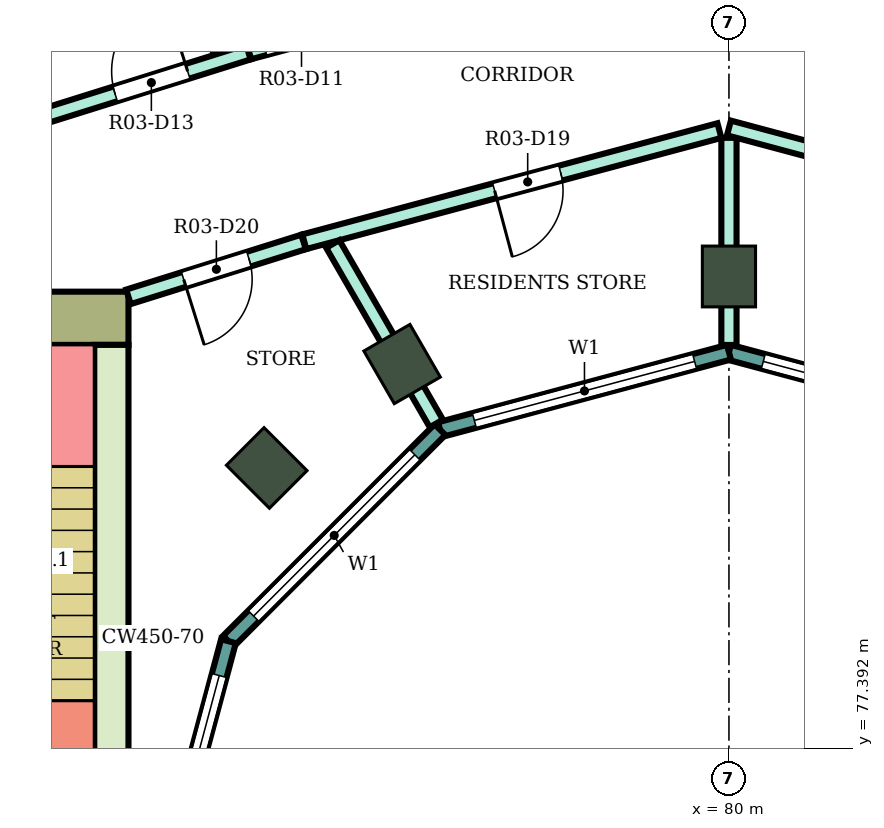
"""IFC4 building model, lengths in metres.
Left out: names, types, materials, properties, quantities, classifications, styles, units other than length and angle.
Written with IfcOpenShell. Run it as: python <this file> out.ifc"""

import sys

from ifc_helpers import new_model, si_unit, direction, frame, frame_2d, origin, origin_2d, place, context, subcontext, project, spatial, rectangle, extrude, element, fill, save


model = new_model("IFC4")
c1 = context("Model", 3, precision=1e-05, world=origin(), true_north=direction((0.0, 1.0)))
c2 = subcontext(c1, "Body", "Model", "MODEL_VIEW")
j1 = project(units=[si_unit("LENGTHUNIT", "METRE"), si_unit("PLANEANGLEUNIT", "RADIAN")], contexts=[c1])
p1 = place(None, origin())
s1 = spatial("IfcSite", under=j1, at=p1, CompositionType="ELEMENT")
p2 = place(p1, origin())
s2 = spatial("IfcBuilding", under=s1, at=p2, CompositionType="ELEMENT")
p3 = place(p2, frame((0.0, 0.0, 190.5)))
s3 = spatial("IfcBuildingStorey", under=s2, at=p3, CompositionType="ELEMENT", Elevation=190.5)
for number, where, z_axis, x_axis in (
    (1, (80.0, 83.6, 0.0), (0.0, 0.0, 1.0), (0.0, 1.0, 0.0)),
    (2, (75.7, 82.448, 0.0), (0.0, 0.0, 1.0), (-0.5, 0.866, 0.0)),
    (3, (73.919, 81.081, 0.0), (0.0, 0.0, 1.0), (-0.707, 0.707, 0.0)),
):
    element("IfcColumn", number, at=place(p3, frame(where, z_axis=z_axis, x_axis=x_axis)), inside=s3, PredefinedType="COLUMN", context=c2, shape_type="SweptSolid", body=[
        extrude(rectangle(XDim=0.8, YDim=0.7, at=origin_2d()), origin(), (0.0, 0.0, 1.0), 4.1),
    ])
p4 = place(p3, frame((72.1, 83.05, 0.0), z_axis=(0.0, 0.0, 1.0), x_axis=(-1.0, 0.0, 0.0)))
e4 = element("IfcWall", 4, at=p4, inside=s3, PredefinedType="SHEAR", context=c2, shape_type="SweptSolid", body=[
    extrude(rectangle(XDim=14.8, YDim=0.7, at=frame_2d((7.4, 0.0))), origin(), (0.0, 0.0, 1.0), 3.78),
])
p5 = place(p4, frame((4.2, 0.0, 0.0)))
e5 = element("IfcOpeningElement", 5, at=p5, cuts=e4, PredefinedType="OPENING", context=c2, shape_type="SweptSolid", body=[
    extrude(rectangle(XDim=2.4, YDim=2.4, at=frame_2d((1.2, 1.2))), frame((0.0, 0.36, 0.0), z_axis=(0.0, -1.0, 0.0), x_axis=(1.0, 0.0, 0.0)), (0.0, 0.0, 1.0), 0.72),
])
p6 = place(p3, frame((71.875, 82.7, 0.0), z_axis=(0.0, 0.0, 1.0), x_axis=(0.0, -1.0, 0.0)))
e6 = element("IfcWall", 6, at=p6, inside=s3, PredefinedType="SHEAR", context=c2, shape_type="SweptSolid", body=[
    extrude(rectangle(XDim=7.7, YDim=0.45, at=frame_2d((3.85, 0.0))), origin(), (0.0, 0.0, 1.0), 3.78),
])
p7 = place(p3, frame((83.802, 81.585, 0.0), z_axis=(0.0, 0.0, 1.0), x_axis=(-0.965933654434, 0.258789828301, 0.0)))
e7 = element("IfcWall", 7, at=p7, inside=s3, PredefinedType="NOTDEFINED", context=c2, shape_type="SweptSolid", body=[
    extrude(rectangle(XDim=3.936, YDim=0.2, at=frame_2d((1.968, 0.0))), origin(), (0.0, 0.0, 1.0), 4.1),
])
p8 = place(p7, frame((0.468, 0.0, 0.9)))
e8 = element("IfcOpeningElement", 8, at=p8, cuts=e7, PredefinedType="OPENING", context=c2, shape_type="SweptSolid", body=[
    extrude(rectangle(XDim=3.0, YDim=2.3, at=frame_2d((1.5, 1.15))), frame((0.0, 0.11, 0.0), z_axis=(0.0, -1.0, 0.0), x_axis=(1.0, 0.0, 0.0)), (0.0, 0.0, 1.0), 0.22),
])
p9 = place(p3, frame((80.0, 82.604, 0.0), z_axis=(0.0, 0.0, 1.0), x_axis=(-0.965933654434, -0.258789828301, 0.0)))
e9 = element("IfcWall", 9, at=p9, inside=s3, PredefinedType="NOTDEFINED", context=c2, shape_type="SweptSolid", body=[
    extrude(rectangle(XDim=3.936, YDim=0.2, at=frame_2d((1.968, 0.0))), origin(), (0.0, 0.0, 1.0), 4.1),
])
p10 = place(p9, frame((0.468, 0.0, 0.9)))
e10 = element("IfcOpeningElement", 10, at=p10, cuts=e9, PredefinedType="OPENING", context=c2, shape_type="SweptSolid", body=[
    extrude(rectangle(XDim=3.0, YDim=2.3, at=frame_2d((1.5, 1.15))), frame((0.0, 0.11, 0.0), z_axis=(0.0, -1.0, 0.0), x_axis=(1.0, 0.0, 0.0)), (0.0, 0.0, 1.0), 0.22),
])
p11 = place(p3, frame((76.198, 81.585, 0.0), z_axis=(0.0, 0.0, 1.0), x_axis=(-0.707106781187, -0.707106781187, 0.0)))
e11 = element("IfcWall", 11, at=p11, inside=s3, PredefinedType="NOTDEFINED", context=c2, shape_type="SweptSolid", body=[
    extrude(rectangle(XDim=3.936, YDim=0.2, at=frame_2d((1.968, 0.0))), origin(), (0.0, 0.0, 1.0), 4.1),
])
p12 = place(p11, frame((0.468, 0.0, 0.9)))
e12 = element("IfcOpeningElement", 12, at=p12, cuts=e11, PredefinedType="OPENING", context=c2, shape_type="SweptSolid", body=[
    extrude(rectangle(XDim=3.0, YDim=2.3, at=frame_2d((1.5, 1.15))), frame((0.0, 0.11, 0.0), z_axis=(0.0, -1.0, 0.0), x_axis=(1.0, 0.0, 0.0)), (0.0, 0.0, 1.0), 0.22),
])
p13 = place(p3, frame((73.415, 78.802, 0.0), z_axis=(0.0, 0.0, 1.0), x_axis=(-0.258789828301, -0.965933654434, 0.0)))
e13 = element("IfcWall", 13, at=p13, inside=s3, PredefinedType="NOTDEFINED", context=c2, shape_type="SweptSolid", body=[
    extrude(rectangle(XDim=3.936, YDim=0.2, at=frame_2d((1.968, 0.0))), origin(), (0.0, 0.0, 1.0), 4.1),
])
p14 = place(p13, frame((0.468, 0.0, 0.9)))
e14 = element("IfcOpeningElement", 14, at=p14, cuts=e13, PredefinedType="OPENING", context=c2, shape_type="SweptSolid", body=[
    extrude(rectangle(XDim=3.0, YDim=2.3, at=frame_2d((1.5, 1.15))), frame((0.0, 0.11, 0.0), z_axis=(0.0, -1.0, 0.0), x_axis=(1.0, 0.0, 0.0)), (0.0, 0.0, 1.0), 0.22),
])
p15 = place(p3, frame((67.102, 97.342, 0.0), z_axis=(0.0, 0.0, 1.0), x_axis=(0.499940938316, -0.866059500378, 0.0)))
e15 = element("IfcWall", 15, at=p15, inside=s3, PredefinedType="PARTITIONING", context=c2, shape_type="SweptSolid", body=[
    extrude(rectangle(XDim=12.446, YDim=0.2, at=frame_2d((6.223, 0.0))), origin(), (0.0, 0.0, 1.0), 3.65),
])
p16 = place(p3, frame((68.2, 84.833, 0.0), z_axis=(0.0, 0.0, 1.0), x_axis=(0.954204109499, 0.299156342762, 0.0)))
e16 = element("IfcWall", 16, at=p16, inside=s3, PredefinedType="PARTITIONING", context=c2, shape_type="SweptSolid", body=[
    extrude(rectangle(XDim=5.74, YDim=0.2, at=frame_2d((2.87, 0.0))), origin(), (0.0, 0.0, 1.0), 3.65),
])
p17 = place(p16, frame((3.903, 0.0, 0.0)))
e17 = element("IfcOpeningElement", 17, at=p17, cuts=e16, PredefinedType="OPENING", context=c2, shape_type="SweptSolid", body=[
    extrude(rectangle(XDim=1.0, YDim=2.1, at=frame_2d((0.5, 1.05))), frame((0.0, 0.11, 0.0), z_axis=(0.0, -1.0, 0.0), x_axis=(1.0, 0.0, 0.0)), (0.0, 0.0, 1.0), 0.22),
])
p18 = place(p3, frame((72.1, 83.332, 0.0), z_axis=(0.0, 0.0, 1.0), x_axis=(0.954233106619, 0.299063836383, 0.0)))
e18 = element("IfcWall", 18, at=p18, inside=s3, PredefinedType="PARTITIONING", context=c2, shape_type="SweptSolid", body=[
    extrude(rectangle(XDim=2.414, YDim=0.2, at=frame_2d((1.207, 0.0))), origin(), (0.0, 0.0, 1.0), 3.65),
])
p19 = place(p18, frame((0.762, 0.0, 0.0)))
e19 = element("IfcOpeningElement", 19, at=p19, cuts=e18, PredefinedType="OPENING", context=c2, shape_type="SweptSolid", body=[
    extrude(rectangle(XDim=0.9, YDim=2.1, at=frame_2d((0.45, 1.05))), frame((0.0, 0.11, 0.0), z_axis=(0.0, -1.0, 0.0), x_axis=(1.0, 0.0, 0.0)), (0.0, 0.0, 1.0), 0.22),
])
p20 = place(p3, frame((73.687, 86.554, 0.0), z_axis=(0.0, 0.0, 1.0), x_axis=(0.965992724769, 0.258569247387, 0.0)))
e20 = element("IfcWall", 20, at=p20, inside=s3, PredefinedType="PARTITIONING", context=c2, shape_type="SweptSolid", body=[
    extrude(rectangle(XDim=6.486, YDim=0.2, at=frame_2d((3.243, 0.0))), origin(), (0.0, 0.0, 1.0), 3.65),
])
p21 = place(p20, frame((0.214, 0.0, 0.0)))
e21 = element("IfcOpeningElement", 21, at=p21, cuts=e20, PredefinedType="OPENING", context=c2, shape_type="SweptSolid", body=[
    extrude(rectangle(XDim=1.0, YDim=2.1, at=frame_2d((0.5, 1.05))), frame((0.0, 0.11, 0.0), z_axis=(0.0, -1.0, 0.0), x_axis=(1.0, 0.0, 0.0)), (0.0, 0.0, 1.0), 0.22),
])
p22 = place(p3, frame((74.413, 84.057, 0.0), z_axis=(0.0, 0.0, 1.0), x_axis=(0.965972135939, 0.258646153246, 0.0)))
e22 = element("IfcWall", 22, at=p22, inside=s3, PredefinedType="PARTITIONING", context=c2, shape_type="SweptSolid", body=[
    extrude(rectangle(XDim=5.654, YDim=0.2, at=frame_2d((2.827, 0.0))), origin(), (0.0, 0.0, 1.0), 3.65),
])
p23 = place(p22, frame((2.593, 0.0, 0.0)))
e23 = element("IfcOpeningElement", 23, at=p23, cuts=e22, PredefinedType="OPENING", context=c2, shape_type="SweptSolid", body=[
    extrude(rectangle(XDim=0.9, YDim=2.1, at=frame_2d((0.45, 1.05))), frame((0.0, 0.11, 0.0), z_axis=(0.0, -1.0, 0.0), x_axis=(1.0, 0.0, 0.0)), (0.0, 0.0, 1.0), 0.22),
])
p24 = place(p3, frame((74.788, 84.027, 0.0), z_axis=(0.0, 0.0, 1.0), x_axis=(0.499905962189, -0.866079689733, 0.0)))
e24 = element("IfcWall", 24, at=p24, inside=s3, PredefinedType="PARTITIONING", context=c2, shape_type="SweptSolid", body=[
    extrude(rectangle(XDim=2.726, YDim=0.2, at=frame_2d((1.363, 0.0))), origin(), (0.0, 0.0, 1.0), 3.65),
])
p25 = place(p3, frame((80.0, 82.699, 0.0), z_axis=(0.0, 0.0, 1.0), x_axis=(0.0, 1.0, 0.0)))
e25 = element("IfcWall", 25, at=p25, inside=s3, PredefinedType="PARTITIONING", context=c2, shape_type="SweptSolid", body=[
    extrude(rectangle(XDim=2.725, YDim=0.2, at=frame_2d((1.363, 0.0))), origin(), (0.0, 0.0, 1.0), 3.65),
])
p26 = place(p3, frame((80.0, 85.554, 0.0), z_axis=(0.0, 0.0, 1.0), x_axis=(0.965928989968, -0.258807237802, 0.0)))
e26 = element("IfcWall", 26, at=p26, inside=s3, PredefinedType="PARTITIONING", context=c2, shape_type="SweptSolid", body=[
    extrude(rectangle(XDim=5.774, YDim=0.2, at=frame_2d((2.887, 0.0))), origin(), (0.0, 0.0, 1.0), 3.65),
])
p27 = place(p26, frame((2.292, 0.0, 0.0)))
e27 = element("IfcOpeningElement", 27, at=p27, cuts=e26, PredefinedType="OPENING", context=c2, shape_type="SweptSolid", body=[
    extrude(rectangle(XDim=0.9, YDim=2.1, at=frame_2d((0.45, 1.05))), frame((0.0, 0.11, 0.0), z_axis=(0.0, -1.0, 0.0), x_axis=(1.0, 0.0, 0.0)), (0.0, 0.0, 1.0), 0.22),
])
p28 = place(p3, frame((80.048, 88.233, 0.0), z_axis=(0.0, 0.0, 1.0), x_axis=(0.965787353661, -0.259335280109, 0.0)))
e28 = element("IfcWall", 28, at=p28, inside=s3, PredefinedType="PARTITIONING", context=c2, shape_type="SweptSolid", body=[
    extrude(rectangle(XDim=6.476, YDim=0.2, at=frame_2d((3.238, 0.0))), origin(), (0.0, 0.0, 1.0), 3.65),
])
p29 = place(p28, frame((4.936, 0.0, 0.0)))
e29 = element("IfcOpeningElement", 29, at=p29, cuts=e28, PredefinedType="OPENING", context=c2, shape_type="SweptSolid", body=[
    extrude(rectangle(XDim=1.0, YDim=2.1, at=frame_2d((0.5, 1.05))), frame((0.0, 0.11, 0.0), z_axis=(0.0, -1.0, 0.0), x_axis=(1.0, 0.0, 0.0)), (0.0, 0.0, 1.0), 0.22),
])
p30 = place(p8, origin())
e30 = element("IfcWindow", 30, at=p30, inside=s3, PartitioningType="SINGLE_PANEL", PredefinedType="WINDOW", context=c2, shape_type="SweptSolid", body=[
    extrude(rectangle(XDim=3.0, YDim=2.3, at=frame_2d((1.5, 1.15))), frame((0.0, 0.03, 0.0), z_axis=(0.0, -1.0, 0.0), x_axis=(1.0, 0.0, 0.0)), (0.0, 0.0, 1.0), 0.06),
])
fill(e8, e30)
p31 = place(p10, origin())
e31 = element("IfcWindow", 31, at=p31, inside=s3, PartitioningType="SINGLE_PANEL", PredefinedType="WINDOW", context=c2, shape_type="SweptSolid", body=[
    extrude(rectangle(XDim=3.0, YDim=2.3, at=frame_2d((1.5, 1.15))), frame((0.0, 0.03, 0.0), z_axis=(0.0, -1.0, 0.0), x_axis=(1.0, 0.0, 0.0)), (0.0, 0.0, 1.0), 0.06),
])
fill(e10, e31)
p32 = place(p12, origin())
e32 = element("IfcWindow", 32, at=p32, inside=s3, PartitioningType="SINGLE_PANEL", PredefinedType="WINDOW", context=c2, shape_type="SweptSolid", body=[
    extrude(rectangle(XDim=3.0, YDim=2.3, at=frame_2d((1.5, 1.15))), frame((0.0, 0.03, 0.0), z_axis=(0.0, -1.0, 0.0), x_axis=(1.0, 0.0, 0.0)), (0.0, 0.0, 1.0), 0.06),
])
fill(e12, e32)
p33 = place(p14, origin())
e33 = element("IfcWindow", 33, at=p33, inside=s3, PartitioningType="SINGLE_PANEL", PredefinedType="WINDOW", context=c2, shape_type="SweptSolid", body=[
    extrude(rectangle(XDim=3.0, YDim=2.3, at=frame_2d((1.5, 1.15))), frame((0.0, 0.03, 0.0), z_axis=(0.0, -1.0, 0.0), x_axis=(1.0, 0.0, 0.0)), (0.0, 0.0, 1.0), 0.06),
])
fill(e14, e33)
p34 = place(p17, origin())
e34 = element("IfcDoor", 34, at=p34, inside=s3, OperationType="SINGLE_SWING_RIGHT", PredefinedType="DOOR", context=c2, shape_type="SweptSolid", body=[
    extrude(rectangle(XDim=1.0, YDim=2.1, at=frame_2d((0.5, 1.05))), frame((0.0, 0.025, 0.0), z_axis=(0.0, -1.0, 0.0), x_axis=(1.0, 0.0, 0.0)), (0.0, 0.0, 1.0), 0.05),
])
fill(e17, e34)
p35 = place(p23, frame((0.9, 0.0, 0.0), z_axis=(0.0, 0.0, 1.0), x_axis=(-1.0, 0.0, 0.0)))
e35 = element("IfcDoor", 35, at=p35, inside=s3, OperationType="SINGLE_SWING_RIGHT", PredefinedType="DOOR", context=c2, shape_type="SweptSolid", body=[
    extrude(rectangle(XDim=0.9, YDim=2.1, at=frame_2d((0.45, 1.05))), frame((0.0, 0.025, 0.0), z_axis=(0.0, -1.0, 0.0), x_axis=(1.0, 0.0, 0.0)), (0.0, 0.0, 1.0), 0.05),
])
fill(e23, e35)
p36 = place(p19, frame((0.9, 0.0, 0.0), z_axis=(0.0, 0.0, 1.0), x_axis=(-1.0, 0.0, 0.0)))
e36 = element("IfcDoor", 36, at=p36, inside=s3, OperationType="SINGLE_SWING_RIGHT", PredefinedType="DOOR", context=c2, shape_type="SweptSolid", body=[
    extrude(rectangle(XDim=0.9, YDim=2.1, at=frame_2d((0.45, 1.05))), frame((0.0, 0.025, 0.0), z_axis=(0.0, -1.0, 0.0), x_axis=(1.0, 0.0, 0.0)), (0.0, 0.0, 1.0), 0.05),
])
fill(e19, e36)
save(model, sys.argv[1])
